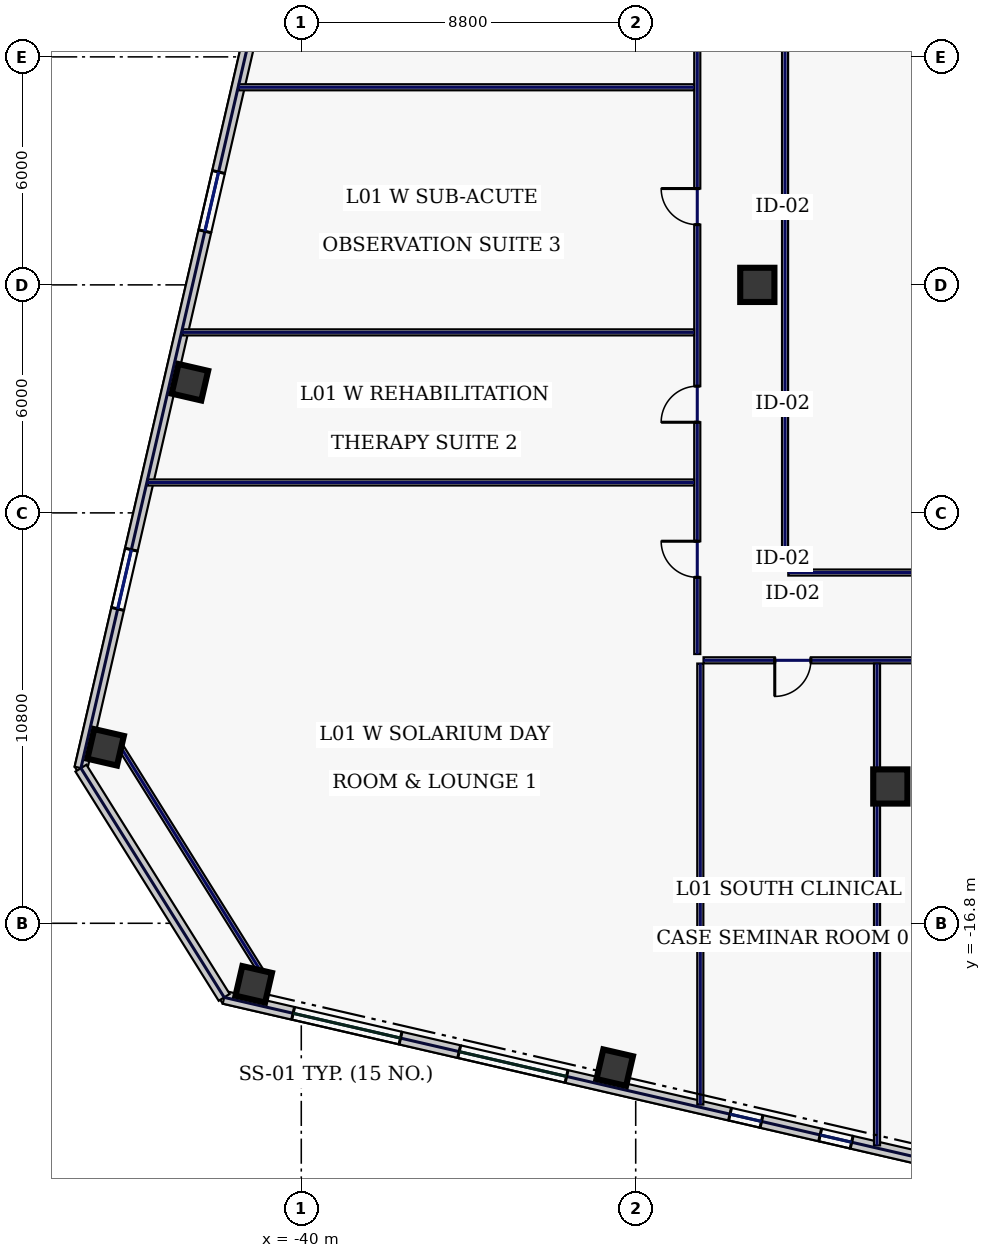
"""IFC4 building model, lengths in metres.
Left out: names, types, materials, properties, quantities, classifications, styles, units other than length and angle.
Written with IfcOpenShell. Run it as: python <this file> out.ifc"""

import sys

from ifc_helpers import new_model, si_unit, direction, frame, frame_2d, origin, origin_2d, place, context, subcontext, project, spatial, rectangle, hollow_rectangle, extrude, element, fill, save


model = new_model("IFC4")
c1 = context("Model", 3, precision=1e-05, world=origin(), true_north=direction((0.0, 1.0)))
c2 = subcontext(c1, "Body", "Model", "MODEL_VIEW")
j1 = project(units=[si_unit("LENGTHUNIT", "METRE"), si_unit("PLANEANGLEUNIT", "RADIAN")], contexts=[c1])
p1 = place(None, origin())
s1 = spatial("IfcSite", under=j1, at=p1, CompositionType="ELEMENT")
p2 = place(p1, origin())
s2 = spatial("IfcBuilding", under=s1, at=p2, CompositionType="ELEMENT")
p3 = place(p2, frame((0.0, 0.0, 8.4)))
s3 = spatial("IfcBuildingStorey", under=s2, at=p3, CompositionType="ELEMENT", Elevation=8.4)
for number, where, z_axis, x_axis in (
    (1, (-24.5, -13.2, 0.0), (0.0, 0.0, 1.0), (1.0, 0.0, 0.0)),
    (2, (-28.0, 0.0, 0.0), (0.0, 0.0, 1.0), (1.0, 0.0, 0.0)),
):
    element("IfcColumn", number, at=place(p3, frame(where, z_axis=z_axis, x_axis=x_axis)), inside=s3, PredefinedType="COLUMN", context=c2, shape_type="SweptSolid", body=[
        extrude(hollow_rectangle(XDim=0.9, YDim=0.9, WallThickness=0.04, at=origin_2d()), origin(), (0.0, 0.0, 1.0), 4.7),
    ])
for number, where, z_axis, x_axis in (
    (3, (-41.251, -18.406, 0.0), (0.0, 0.0, 1.0), (0.974, -0.225, 0.0)),
    (4, (-31.752, -20.599, 0.0), (0.0, 0.0, 1.0), (0.974, -0.225, 0.0)),
    (5, (-42.93, -2.562, 0.0), (0.0, 0.0, 1.0), (0.974, -0.225, 0.0)),
    (6, (-45.148, -12.169, 0.0), (0.0, 0.0, 1.0), (0.974, -0.225, 0.0)),
):
    element("IfcColumn", number, at=place(p3, frame(where, z_axis=z_axis, x_axis=x_axis)), inside=s3, PredefinedType="COLUMN", context=c2, shape_type="SweptSolid", body=[
        extrude(hollow_rectangle(XDim=0.8, YDim=0.8, WallThickness=0.036, at=origin_2d()), origin(), (0.0, 0.0, 1.0), 4.7),
    ])
p4 = place(p3, frame((-42.029, -18.75, 0.0), z_axis=(0.0, 0.0, 1.0), x_axis=(0.97436993772, -0.224951604723, 0.0)))
e7 = element("IfcWall", 7, at=p4, inside=s3, PredefinedType="STANDARD", context=c2, shape_type="SweptSolid", body=[
    extrude(rectangle(XDim=22.651, YDim=0.34, at=frame_2d((11.326, 0.0))), origin(), (0.0, 0.0, 1.0), 4.7),
])
p5 = place(p4, frame((1.862, 0.0, 0.85)))
e8 = element("IfcOpeningElement", 8, at=p5, cuts=e7, PredefinedType="OPENING", context=c2, shape_type="SweptSolid", body=[
    extrude(rectangle(XDim=2.9, YDim=2.3, at=frame_2d((1.45, 1.15))), frame((0.0, 0.18, 0.0), z_axis=(0.0, -1.0, 0.0), x_axis=(1.0, 0.0, 0.0)), (0.0, 0.0, 1.0), 0.36),
])
p6 = place(p4, frame((6.346, 0.0, 0.85)))
e9 = element("IfcOpeningElement", 9, at=p6, cuts=e7, PredefinedType="OPENING", context=c2, shape_type="SweptSolid", body=[
    extrude(rectangle(XDim=2.9, YDim=2.3, at=frame_2d((1.45, 1.15))), frame((0.0, 0.18, 0.0), z_axis=(0.0, -1.0, 0.0), x_axis=(1.0, 0.0, 0.0)), (0.0, 0.0, 1.0), 0.36),
])
p7 = place(p4, frame((13.661, 0.0, 0.85)))
e10 = element("IfcOpeningElement", 10, at=p7, cuts=e7, PredefinedType="OPENING", context=c2, shape_type="SweptSolid", body=[
    extrude(rectangle(XDim=0.85, YDim=1.85, at=frame_2d((0.425, 0.925))), frame((0.0, 0.18, 0.0), z_axis=(0.0, -1.0, 0.0), x_axis=(1.0, 0.0, 0.0)), (0.0, 0.0, 1.0), 0.36),
])
p8 = place(p4, frame((16.095, 0.0, 0.85)))
e11 = element("IfcOpeningElement", 11, at=p8, cuts=e7, PredefinedType="OPENING", context=c2, shape_type="SweptSolid", body=[
    extrude(rectangle(XDim=0.85, YDim=1.85, at=frame_2d((0.425, 0.925))), frame((0.0, 0.18, 0.0), z_axis=(0.0, -1.0, 0.0), x_axis=(1.0, 0.0, 0.0)), (0.0, 0.0, 1.0), 0.36),
])
p9 = place(p3, frame((-36.62, 27.037, 0.0), z_axis=(0.0, 0.0, 1.0), x_axis=(-0.224951280646, -0.974370012539, 0.0)))
e12 = element("IfcWall", 12, at=p9, inside=s3, PredefinedType="STANDARD", context=c2, shape_type="SweptSolid", body=[
    extrude(rectangle(XDim=40.8, YDim=0.34, at=frame_2d((20.4, 0.0))), origin(), (0.0, 0.0, 1.0), 4.7),
])
p10 = place(p9, frame((4.3, 0.0, 0.58)))
e13 = element("IfcOpeningElement", 13, at=p10, cuts=e12, PredefinedType="OPENING", context=c2, shape_type="SweptSolid", body=[
    extrude(rectangle(XDim=1.6, YDim=2.3, at=frame_2d((0.8, 1.15))), frame((0.0, 0.18, 0.0), z_axis=(0.0, -1.0, 0.0), x_axis=(1.0, 0.0, 0.0)), (0.0, 0.0, 1.0), 0.36),
])
p11 = place(p9, frame((14.5, 0.0, 0.58)))
e14 = element("IfcOpeningElement", 14, at=p11, cuts=e12, PredefinedType="OPENING", context=c2, shape_type="SweptSolid", body=[
    extrude(rectangle(XDim=1.6, YDim=2.3, at=frame_2d((0.8, 1.15))), frame((0.0, 0.18, 0.0), z_axis=(0.0, -1.0, 0.0), x_axis=(1.0, 0.0, 0.0)), (0.0, 0.0, 1.0), 0.36),
])
p12 = place(p9, frame((24.7, 0.0, 0.58)))
e15 = element("IfcOpeningElement", 15, at=p12, cuts=e12, PredefinedType="OPENING", context=c2, shape_type="SweptSolid", body=[
    extrude(rectangle(XDim=1.6, YDim=2.3, at=frame_2d((0.8, 1.15))), frame((0.0, 0.18, 0.0), z_axis=(0.0, -1.0, 0.0), x_axis=(1.0, 0.0, 0.0)), (0.0, 0.0, 1.0), 0.36),
])
p13 = place(p9, frame((34.9, 0.0, 0.58)))
e16 = element("IfcOpeningElement", 16, at=p13, cuts=e12, PredefinedType="OPENING", context=c2, shape_type="SweptSolid", body=[
    extrude(rectangle(XDim=1.6, YDim=2.3, at=frame_2d((0.8, 1.15))), frame((0.0, 0.18, 0.0), z_axis=(0.0, -1.0, 0.0), x_axis=(1.0, 0.0, 0.0)), (0.0, 0.0, 1.0), 0.36),
])
p14 = place(p3, frame((-45.798, -12.717, 0.0), z_axis=(0.0, 0.0, 1.0), x_axis=(0.529906387556, -0.848056142261, 0.0)))
e17 = element("IfcWall", 17, at=p14, inside=s3, PredefinedType="STANDARD", context=c2, shape_type="SweptSolid", body=[
    extrude(rectangle(XDim=7.114, YDim=0.34, at=frame_2d((3.557, 0.0))), origin(), (0.0, 0.0, 1.0), 4.7),
])
p15 = place(p3, frame((-44.86, -11.989, 0.0), z_axis=(0.0, 0.0, 1.0), x_axis=(0.52991239767, -0.848052386823, 0.0)))
e18 = element("IfcWall", 18, at=p15, inside=s3, PredefinedType="PARTITIONING", context=c2, shape_type="SweptSolid", body=[
    extrude(rectangle(XDim=7.354, YDim=0.16, at=frame_2d((3.677, 0.0))), origin(), (0.0, 0.0, 1.0), 4.7),
])
p16 = place(p3, frame((-29.58, -9.715, 0.0), z_axis=(0.0, 0.0, 1.0), x_axis=(0.0, 1.0, 0.0)))
e19 = element("IfcWall", 19, at=p16, inside=s3, PredefinedType="PARTITIONING", context=c2, shape_type="SweptSolid", body=[
    extrude(rectangle(XDim=19.43, YDim=0.16, at=frame_2d((9.715, 0.0))), origin(), (0.0, 0.0, 1.0), 4.7),
])
p17 = place(p16, frame((2.019, 0.0, 0.0)))
e20 = element("IfcOpeningElement", 20, at=p17, cuts=e19, PredefinedType="OPENING", context=c2, shape_type="SweptSolid", body=[
    extrude(rectangle(XDim=0.95, YDim=2.2, at=frame_2d((0.475, 1.1))), frame((0.0, 0.09, 0.0), z_axis=(0.0, -1.0, 0.0), x_axis=(1.0, 0.0, 0.0)), (0.0, 0.0, 1.0), 0.18),
])
p18 = place(p16, frame((6.1, 0.0, 0.0)))
e21 = element("IfcOpeningElement", 21, at=p18, cuts=e19, PredefinedType="OPENING", context=c2, shape_type="SweptSolid", body=[
    extrude(rectangle(XDim=0.95, YDim=2.2, at=frame_2d((0.475, 1.1))), frame((0.0, 0.09, 0.0), z_axis=(0.0, -1.0, 0.0), x_axis=(1.0, 0.0, 0.0)), (0.0, 0.0, 1.0), 0.18),
])
p19 = place(p16, frame((11.3, 0.0, 0.0)))
e22 = element("IfcOpeningElement", 22, at=p19, cuts=e19, PredefinedType="OPENING", context=c2, shape_type="SweptSolid", body=[
    extrude(rectangle(XDim=0.95, YDim=2.2, at=frame_2d((0.475, 1.1))), frame((0.0, 0.09, 0.0), z_axis=(0.0, -1.0, 0.0), x_axis=(1.0, 0.0, 0.0)), (0.0, 0.0, 1.0), 0.18),
])
p20 = place(p16, frame((16.631, 0.0, 0.0)))
e23 = element("IfcOpeningElement", 23, at=p20, cuts=e19, PredefinedType="OPENING", context=c2, shape_type="SweptSolid", body=[
    extrude(rectangle(XDim=0.95, YDim=2.2, at=frame_2d((0.475, 1.1))), frame((0.0, 0.09, 0.0), z_axis=(0.0, -1.0, 0.0), x_axis=(1.0, 0.0, 0.0)), (0.0, 0.0, 1.0), 0.18),
])
p21 = place(p3, frame((-6.915, -9.88, 0.0), z_axis=(0.0, 0.0, 1.0), x_axis=(-1.0, 0.0, 0.0)))
e24 = element("IfcWall", 24, at=p21, inside=s3, PredefinedType="PARTITIONING", context=c2, shape_type="SweptSolid", body=[
    extrude(rectangle(XDim=22.5, YDim=0.16, at=frame_2d((11.25, 0.0))), origin(), (0.0, 0.0, 1.0), 4.7),
])
p22 = place(p21, frame((19.676, 0.0, 0.0)))
e25 = element("IfcOpeningElement", 25, at=p22, cuts=e24, PredefinedType="OPENING", context=c2, shape_type="SweptSolid", body=[
    extrude(rectangle(XDim=0.95, YDim=2.2, at=frame_2d((0.475, 1.1))), frame((0.0, 0.09, 0.0), z_axis=(0.0, -1.0, 0.0), x_axis=(1.0, 0.0, 0.0)), (0.0, 0.0, 1.0), 0.18),
])
p23 = place(p21, frame((12.7, 0.0, 0.0)))
e26 = element("IfcOpeningElement", 26, at=p23, cuts=e24, PredefinedType="OPENING", context=c2, shape_type="SweptSolid", body=[
    extrude(rectangle(XDim=0.95, YDim=2.2, at=frame_2d((0.475, 1.1))), frame((0.0, 0.09, 0.0), z_axis=(0.0, -1.0, 0.0), x_axis=(1.0, 0.0, 0.0)), (0.0, 0.0, 1.0), 0.18),
])
p24 = place(p21, frame((3.884, 0.0, 0.0)))
e27 = element("IfcOpeningElement", 27, at=p24, cuts=e24, PredefinedType="OPENING", context=c2, shape_type="SweptSolid", body=[
    extrude(rectangle(XDim=1.05, YDim=2.2, at=frame_2d((0.525, 1.1))), frame((0.0, 0.09, 0.0), z_axis=(0.0, -1.0, 0.0), x_axis=(1.0, 0.0, 0.0)), (0.0, 0.0, 1.0), 0.18),
])
p25 = place(p3, frame((-27.27, 7.485, 0.0), z_axis=(0.0, 0.0, 1.0), x_axis=(0.0, -1.0, 0.0)))
e28 = element("IfcWall", 28, at=p25, inside=s3, PredefinedType="PARTITIONING", context=c2, shape_type="SweptSolid", body=[
    extrude(rectangle(XDim=14.97, YDim=0.16, at=frame_2d((7.485, 0.0))), origin(), (0.0, 0.0, 1.0), 4.7),
])
p26 = place(p3, frame((-27.185, -7.57, 0.0), z_axis=(0.0, 0.0, 1.0), x_axis=(1.0, 0.0, 0.0)))
e29 = element("IfcWall", 29, at=p26, inside=s3, PredefinedType="PARTITIONING", context=c2, shape_type="SweptSolid", body=[
    extrude(rectangle(XDim=16.52, YDim=0.16, at=frame_2d((8.26, 0.0))), origin(), (0.0, 0.0, 1.0), 4.7),
])
p27 = place(p3, frame((-29.5, -21.571, 0.0), z_axis=(0.0, 0.0, 1.0), x_axis=(0.0, 1.0, 0.0)))
e30 = element("IfcWall", 30, at=p27, inside=s3, PredefinedType="PARTITIONING", context=c2, shape_type="SweptSolid", body=[
    extrude(rectangle(XDim=11.605, YDim=0.16, at=frame_2d((5.803, 0.0))), origin(), (0.0, 0.0, 1.0), 4.7),
])
p28 = place(p3, frame((-24.85, -22.644, 0.0), z_axis=(0.0, 0.0, 1.0), x_axis=(0.0, 1.0, 0.0)))
e31 = element("IfcWall", 31, at=p28, inside=s3, PredefinedType="PARTITIONING", context=c2, shape_type="SweptSolid", body=[
    extrude(rectangle(XDim=12.679, YDim=0.16, at=frame_2d((6.339, 0.0))), origin(), (0.0, 0.0, 1.0), 4.7),
])
p29 = place(p3, frame((-44.042, -5.2, 0.0), z_axis=(0.0, 0.0, 1.0), x_axis=(1.0, 0.0, 0.0)))
e32 = element("IfcWall", 32, at=p29, inside=s3, PredefinedType="PARTITIONING", context=c2, shape_type="SweptSolid", body=[
    extrude(rectangle(XDim=14.377, YDim=0.16, at=frame_2d((7.188, 0.0))), origin(), (0.0, 0.0, 1.0), 4.7),
])
p30 = place(p3, frame((-43.13, -1.25, 0.0), z_axis=(0.0, 0.0, 1.0), x_axis=(1.0, 0.0, 0.0)))
e33 = element("IfcWall", 33, at=p30, inside=s3, PredefinedType="PARTITIONING", context=c2, shape_type="SweptSolid", body=[
    extrude(rectangle(XDim=13.465, YDim=0.16, at=frame_2d((6.732, 0.0))), origin(), (0.0, 0.0, 1.0), 4.195),
])
p31 = place(p3, frame((-41.641, 5.2, 0.0), z_axis=(0.0, 0.0, 1.0), x_axis=(1.0, 0.0, 0.0)))
e34 = element("IfcWall", 34, at=p31, inside=s3, PredefinedType="PARTITIONING", context=c2, shape_type="SweptSolid", body=[
    extrude(rectangle(XDim=11.976, YDim=0.16, at=frame_2d((5.988, 0.0))), origin(), (0.0, 0.0, 1.0), 4.7),
])
p32 = place(p5, origin())
e35 = element("IfcWindow", 35, at=p32, inside=s3, PartitioningType="SINGLE_PANEL", PredefinedType="WINDOW", context=c2, shape_type="SweptSolid", body=[
    extrude(rectangle(XDim=2.9, YDim=2.3, at=frame_2d((1.45, 1.15))), frame((0.0, 0.03, 0.0), z_axis=(0.0, -1.0, 0.0), x_axis=(1.0, 0.0, 0.0)), (0.0, 0.0, 1.0), 0.06),
])
fill(e8, e35)
p33 = place(p6, origin())
e36 = element("IfcWindow", 36, at=p33, inside=s3, PartitioningType="SINGLE_PANEL", PredefinedType="WINDOW", context=c2, shape_type="SweptSolid", body=[
    extrude(rectangle(XDim=2.9, YDim=2.3, at=frame_2d((1.45, 1.15))), frame((0.0, 0.03, 0.0), z_axis=(0.0, -1.0, 0.0), x_axis=(1.0, 0.0, 0.0)), (0.0, 0.0, 1.0), 0.06),
])
fill(e9, e36)
p34 = place(p7, origin())
e37 = element("IfcWindow", 37, at=p34, inside=s3, PartitioningType="SINGLE_PANEL", PredefinedType="WINDOW", context=c2, shape_type="SweptSolid", body=[
    extrude(rectangle(XDim=0.85, YDim=1.85, at=frame_2d((0.425, 0.925))), frame((0.0, 0.03, 0.0), z_axis=(0.0, -1.0, 0.0), x_axis=(1.0, 0.0, 0.0)), (0.0, 0.0, 1.0), 0.06),
])
fill(e10, e37)
p35 = place(p8, origin())
e38 = element("IfcWindow", 38, at=p35, inside=s3, PartitioningType="SINGLE_PANEL", PredefinedType="WINDOW", context=c2, shape_type="SweptSolid", body=[
    extrude(rectangle(XDim=0.85, YDim=1.85, at=frame_2d((0.425, 0.925))), frame((0.0, 0.03, 0.0), z_axis=(0.0, -1.0, 0.0), x_axis=(1.0, 0.0, 0.0)), (0.0, 0.0, 1.0), 0.06),
])
fill(e11, e38)
p36 = place(p12, origin())
e39 = element("IfcWindow", 39, at=p36, inside=s3, PartitioningType="SINGLE_PANEL", PredefinedType="WINDOW", context=c2, shape_type="SweptSolid", body=[
    extrude(rectangle(XDim=1.6, YDim=2.3, at=frame_2d((0.8, 1.15))), frame((0.0, 0.03, 0.0), z_axis=(0.0, -1.0, 0.0), x_axis=(1.0, 0.0, 0.0)), (0.0, 0.0, 1.0), 0.06),
])
fill(e15, e39)
p37 = place(p13, origin())
e40 = element("IfcWindow", 40, at=p37, inside=s3, PartitioningType="SINGLE_PANEL", PredefinedType="WINDOW", context=c2, shape_type="SweptSolid", body=[
    extrude(rectangle(XDim=1.6, YDim=2.3, at=frame_2d((0.8, 1.15))), frame((0.0, 0.03, 0.0), z_axis=(0.0, -1.0, 0.0), x_axis=(1.0, 0.0, 0.0)), (0.0, 0.0, 1.0), 0.06),
])
fill(e16, e40)
p38 = place(p22, origin())
e41 = element("IfcDoor", 41, at=p38, inside=s3, OperationType="SINGLE_SWING_RIGHT", PredefinedType="DOOR", context=c2, shape_type="SweptSolid", body=[
    extrude(rectangle(XDim=0.95, YDim=2.2, at=frame_2d((0.475, 1.1))), frame((0.0, 0.025, 0.0), z_axis=(0.0, -1.0, 0.0), x_axis=(1.0, 0.0, 0.0)), (0.0, 0.0, 1.0), 0.05),
])
fill(e25, e41)
p39 = place(p17, origin())
e42 = element("IfcDoor", 42, at=p39, inside=s3, OperationType="SINGLE_SWING_RIGHT", PredefinedType="DOOR", context=c2, shape_type="SweptSolid", body=[
    extrude(rectangle(XDim=0.95, YDim=2.2, at=frame_2d((0.475, 1.1))), frame((0.0, 0.025, 0.0), z_axis=(0.0, -1.0, 0.0), x_axis=(1.0, 0.0, 0.0)), (0.0, 0.0, 1.0), 0.05),
])
fill(e20, e42)
p40 = place(p18, origin())
e43 = element("IfcDoor", 43, at=p40, inside=s3, OperationType="SINGLE_SWING_LEFT", PredefinedType="DOOR", context=c2, shape_type="SweptSolid", body=[
    extrude(rectangle(XDim=0.95, YDim=2.2, at=frame_2d((0.475, 1.1))), frame((0.0, 0.025, 0.0), z_axis=(0.0, -1.0, 0.0), x_axis=(1.0, 0.0, 0.0)), (0.0, 0.0, 1.0), 0.05),
])
fill(e21, e43)
p41 = place(p19, origin())
e44 = element("IfcDoor", 44, at=p41, inside=s3, OperationType="SINGLE_SWING_RIGHT", PredefinedType="DOOR", context=c2, shape_type="SweptSolid", body=[
    extrude(rectangle(XDim=0.95, YDim=2.2, at=frame_2d((0.475, 1.1))), frame((0.0, 0.025, 0.0), z_axis=(0.0, -1.0, 0.0), x_axis=(1.0, 0.0, 0.0)), (0.0, 0.0, 1.0), 0.05),
])
fill(e22, e44)
save(model, sys.argv[1])
